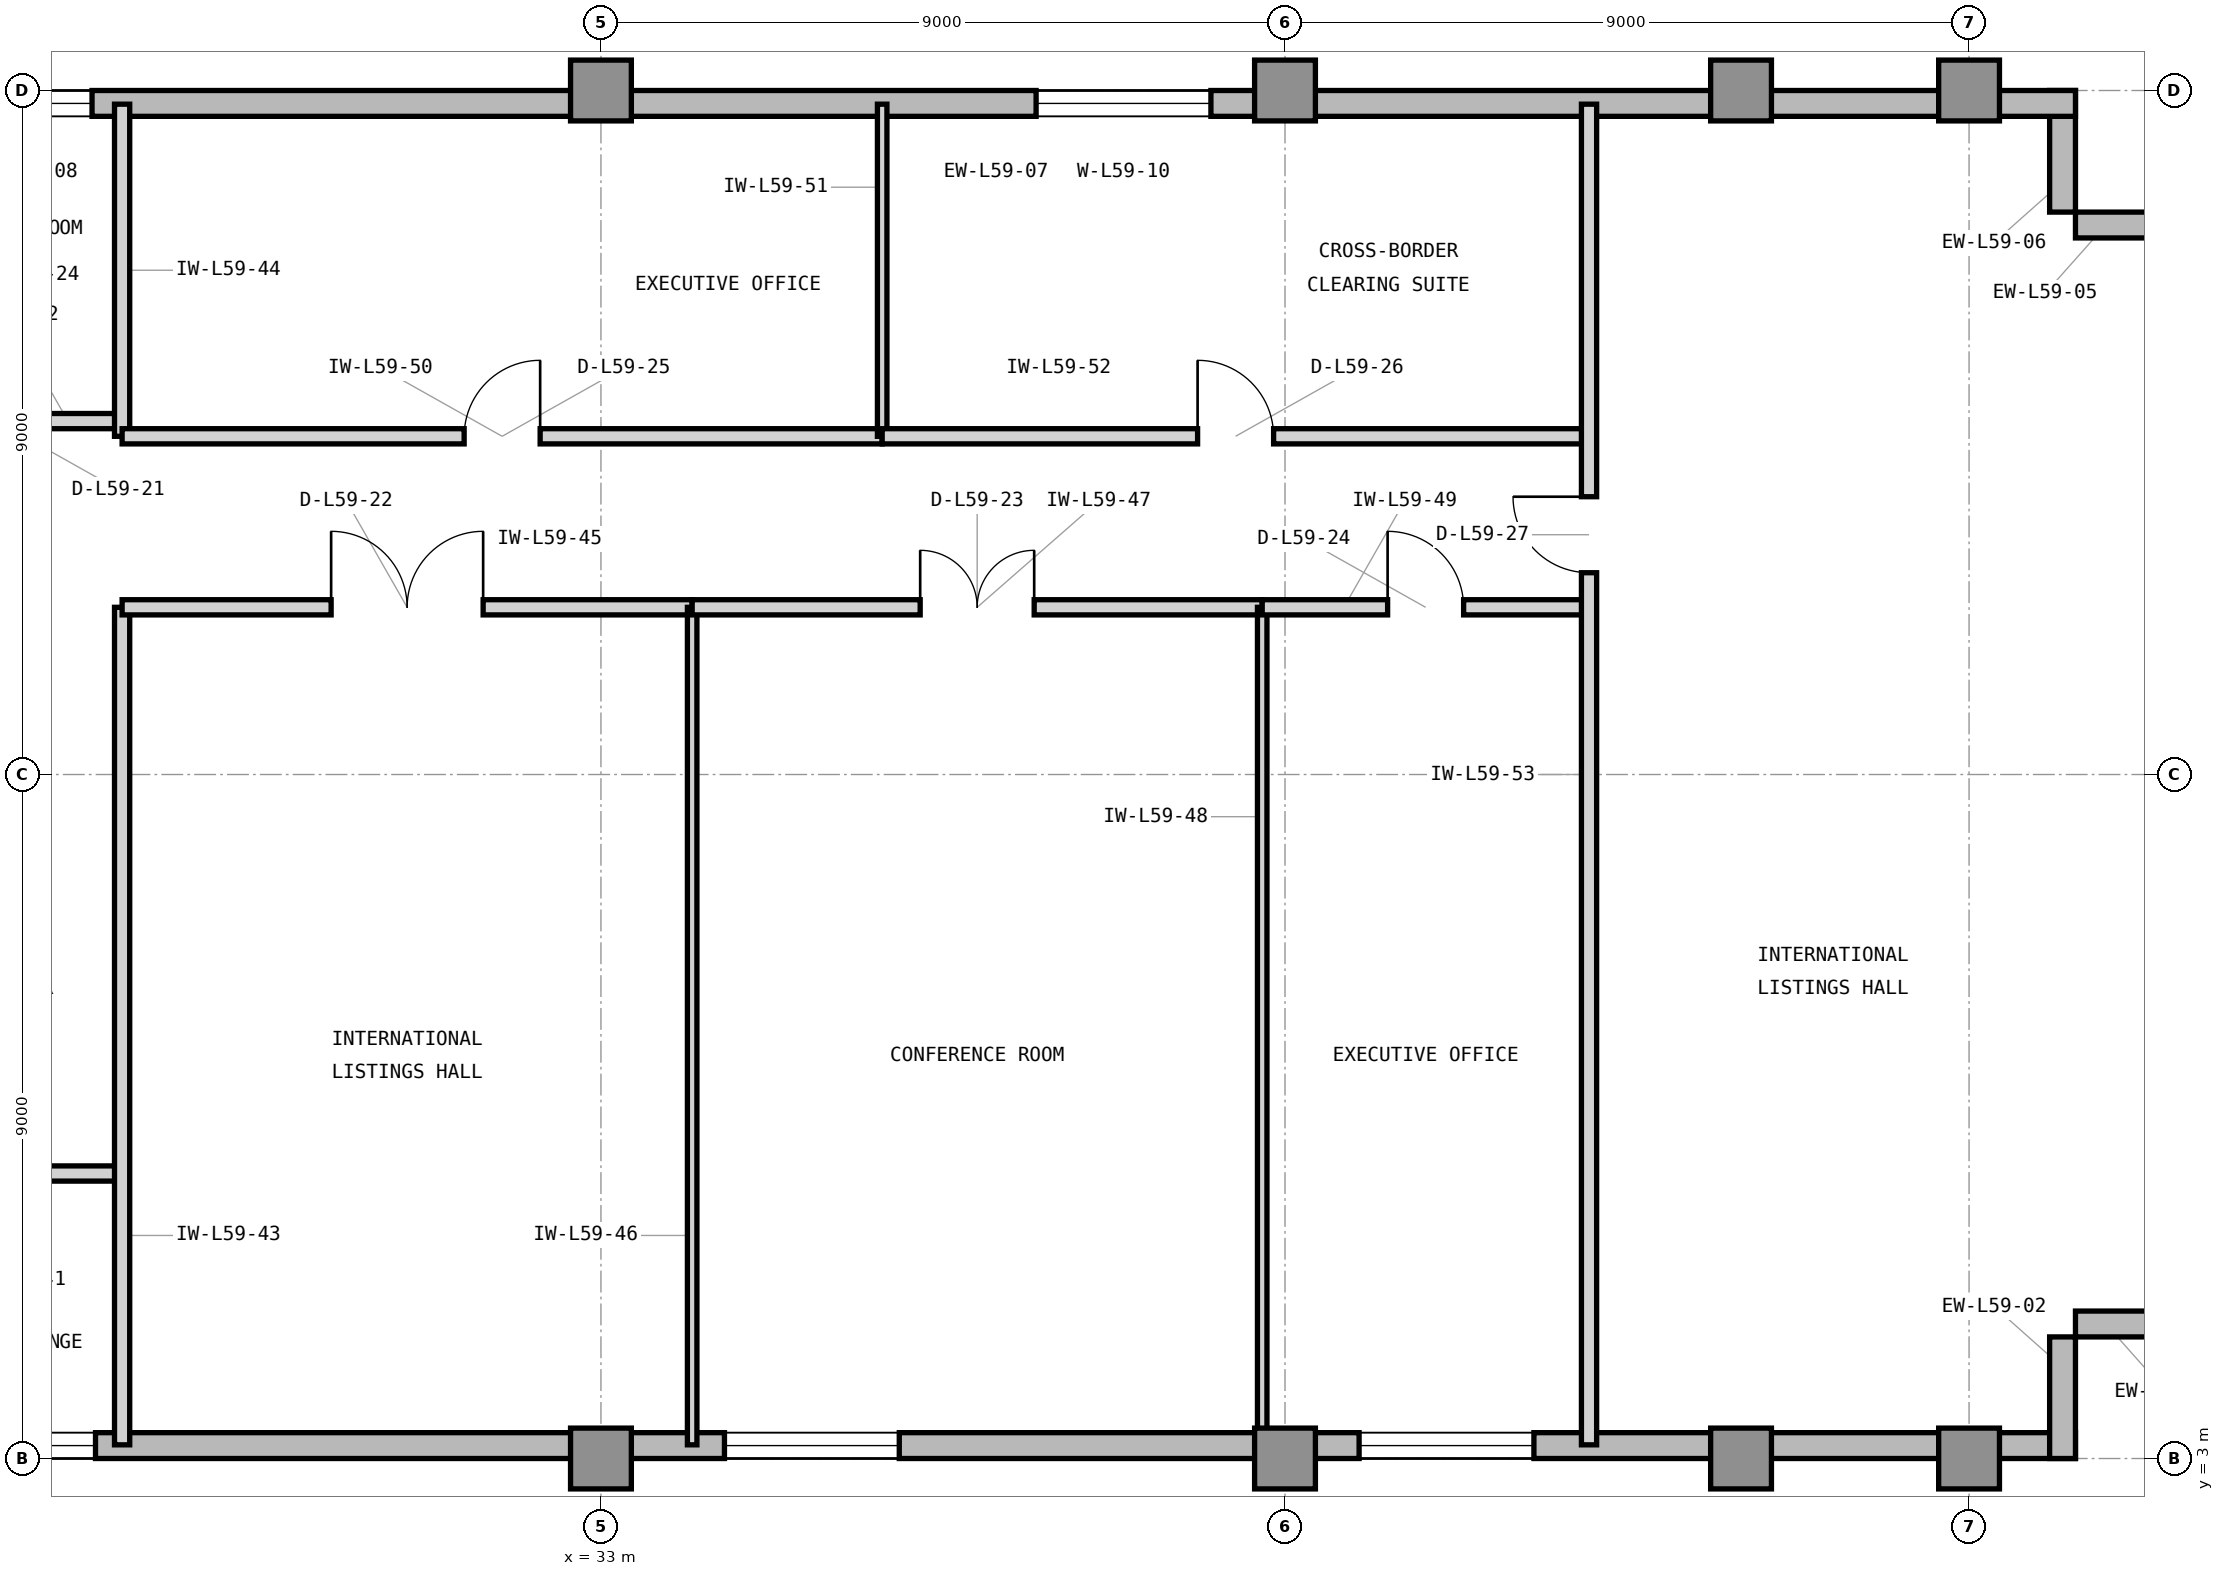
"""IFC4 building model, lengths in metres.
Left out: names, types, materials, properties, quantities, classifications, styles, units other than length and angle.
Written with IfcOpenShell. Run it as: python <this file> out.ifc"""

import sys

from ifc_helpers import new_model, si_unit, direction, frame, frame_2d, origin, origin_2d, place, context, subcontext, project, spatial, rectangle, extrude, element, fill, save


model = new_model("IFC4")
c1 = context("Model", 3, precision=1e-05, world=origin(), true_north=direction((0.0, 1.0)))
c2 = subcontext(c1, "Body", "Model", "MODEL_VIEW")
j1 = project(units=[si_unit("LENGTHUNIT", "METRE"), si_unit("PLANEANGLEUNIT", "RADIAN")], contexts=[c1])
p1 = place(None, origin())
s1 = spatial("IfcSite", under=j1, at=p1, CompositionType="ELEMENT")
p2 = place(p1, origin())
s2 = spatial("IfcBuilding", under=s1, at=p2, CompositionType="ELEMENT")
p3 = place(p2, frame((0.0, 0.0, 243.0)))
s3 = spatial("IfcBuildingStorey", under=s2, at=p3, CompositionType="ELEMENT", Elevation=243.0)
for number, where, z_axis, x_axis in (
    (1, (33.0, 3.0, 0.0), (0.0, 0.0, 1.0), (1.0, 0.0, 0.0)),
    (2, (33.0, 21.0, 0.0), (0.0, 0.0, 1.0), (1.0, 0.0, 0.0)),
    (3, (42.0, 3.0, 0.0), (0.0, 0.0, 1.0), (1.0, 0.0, 0.0)),
    (4, (42.0, 21.0, 0.0), (0.0, 0.0, 1.0), (1.0, 0.0, 0.0)),
    (5, (48.0, 3.0, 0.0), (0.0, 0.0, 1.0), (1.0, 0.0, 0.0)),
    (6, (48.0, 21.0, 0.0), (0.0, 0.0, 1.0), (1.0, 0.0, 0.0)),
    (7, (51.0, 3.0, 0.0), (0.0, 0.0, 1.0), (1.0, 0.0, 0.0)),
    (8, (51.0, 21.0, 0.0), (0.0, 0.0, 1.0), (1.0, 0.0, 0.0)),
):
    element("IfcColumn", number, at=place(p3, frame(where, z_axis=z_axis, x_axis=x_axis)), inside=s3, PredefinedType="COLUMN", context=c2, shape_type="SweptSolid", body=[
        extrude(rectangle(XDim=0.8, YDim=0.8, at=origin_2d()), origin(), (0.0, 0.0, 1.0), 3.9),
    ])
p4 = place(p3, frame((23.9, 3.17, 0.0), z_axis=(0.0, 0.0, 1.0), x_axis=(1.0, 0.0, 0.0)))
e9 = element("IfcWall", 9, at=p4, inside=s3, PredefinedType="STANDARD", context=c2, shape_type="SweptSolid", body=[
    extrude(rectangle(XDim=28.5, YDim=0.34, at=frame_2d((14.25, 0.0))), origin(), (0.0, 0.0, 1.0), 3.7),
])
p5 = place(p4, frame((10.725, 0.0, 0.9)))
e10 = element("IfcOpeningElement", 10, at=p5, cuts=e9, PredefinedType="OPENING", context=c2, shape_type="SweptSolid", body=[
    extrude(rectangle(XDim=2.3, YDim=2.2, at=frame_2d((1.15, 1.1))), frame((0.0, 0.18, 0.0), z_axis=(0.0, -1.0, 0.0), x_axis=(1.0, 0.0, 0.0)), (0.0, 0.0, 1.0), 0.36),
])
p6 = place(p4, frame((0.85, 0.0, 0.9)))
e11 = element("IfcOpeningElement", 11, at=p6, cuts=e9, PredefinedType="OPENING", context=c2, shape_type="SweptSolid", body=[
    extrude(rectangle(XDim=1.6, YDim=2.2, at=frame_2d((0.8, 1.1))), frame((0.0, 0.18, 0.0), z_axis=(0.0, -1.0, 0.0), x_axis=(1.0, 0.0, 0.0)), (0.0, 0.0, 1.0), 0.36),
])
p7 = place(p4, frame((19.075, 0.0, 0.9)))
e12 = element("IfcOpeningElement", 12, at=p7, cuts=e9, PredefinedType="OPENING", context=c2, shape_type="SweptSolid", body=[
    extrude(rectangle(XDim=2.3, YDim=2.2, at=frame_2d((1.15, 1.1))), frame((0.0, 0.18, 0.0), z_axis=(0.0, -1.0, 0.0), x_axis=(1.0, 0.0, 0.0)), (0.0, 0.0, 1.0), 0.36),
])
for number, where, z_axis, x_axis in (
    (13, (52.23, 3.0, 0.0), (0.0, 0.0, 1.0), (0.0, 1.0, 0.0)),
    (14, (52.4, 4.77, 0.0), (0.0, 0.0, 1.0), (1.0, 0.0, 0.0)),
    (15, (54.0, 19.23, 0.0), (0.0, 0.0, 1.0), (-1.0, 0.0, 0.0)),
    (16, (52.23, 19.4, 0.0), (0.0, 0.0, 1.0), (0.0, 1.0, 0.0)),
):
    element("IfcWall", number, at=place(p3, frame(where, z_axis=z_axis, x_axis=x_axis)), inside=s3, PredefinedType="STANDARD", context=c2, shape_type="SweptSolid", body=[
        extrude(rectangle(XDim=1.6, YDim=0.34, at=frame_2d((0.8, 0.0))), origin(), (0.0, 0.0, 1.0), 3.7),
    ])
p8 = place(p3, frame((52.4, 20.83, 0.0), z_axis=(0.0, 0.0, 1.0), x_axis=(-1.0, 0.0, 0.0)))
e17 = element("IfcWall", 17, at=p8, inside=s3, PredefinedType="STANDARD", context=c2, shape_type="SweptSolid", body=[
    extrude(rectangle(XDim=28.4, YDim=0.34, at=frame_2d((14.2, 0.0))), origin(), (0.0, 0.0, 1.0), 3.7),
])
p9 = place(p8, frame((26.096, 0.0, 0.9)))
e18 = element("IfcOpeningElement", 18, at=p9, cuts=e17, PredefinedType="OPENING", context=c2, shape_type="SweptSolid", body=[
    extrude(rectangle(XDim=1.6, YDim=2.2, at=frame_2d((0.8, 1.1))), frame((0.0, 0.18, 0.0), z_axis=(0.0, -1.0, 0.0), x_axis=(1.0, 0.0, 0.0)), (0.0, 0.0, 1.0), 0.36),
])
p10 = place(p8, frame((11.375, 0.0, 0.9)))
e19 = element("IfcOpeningElement", 19, at=p10, cuts=e17, PredefinedType="OPENING", context=c2, shape_type="SweptSolid", body=[
    extrude(rectangle(XDim=2.3, YDim=2.2, at=frame_2d((1.15, 1.1))), frame((0.0, 0.18, 0.0), z_axis=(0.0, -1.0, 0.0), x_axis=(1.0, 0.0, 0.0)), (0.0, 0.0, 1.0), 0.36),
])
p11 = place(p3, frame((23.85, 6.75, 0.0), z_axis=(0.0, 0.0, 1.0), x_axis=(1.0, 0.0, 0.0)))
e20 = element("IfcWall", 20, at=p11, inside=s3, PredefinedType="PARTITIONING", context=c2, shape_type="SweptSolid", body=[
    extrude(rectangle(XDim=2.85, YDim=0.2, at=frame_2d((1.425, 0.0))), origin(), (0.0, 0.0, 1.0), 3.69),
])
p12 = place(p11, frame((0.7, 0.0, 0.0)))
e21 = element("IfcOpeningElement", 21, at=p12, cuts=e20, PredefinedType="OPENING", context=c2, shape_type="SweptSolid", body=[
    extrude(rectangle(XDim=1.0, YDim=2.15, at=frame_2d((0.5, 1.075))), frame((0.0, 0.11, 0.0), z_axis=(0.0, -1.0, 0.0), x_axis=(1.0, 0.0, 0.0)), (0.0, 0.0, 1.0), 0.22),
])
p13 = place(p3, frame((23.85, 16.65, 0.0), z_axis=(0.0, 0.0, 1.0), x_axis=(1.0, 0.0, 0.0)))
e22 = element("IfcWall", 22, at=p13, inside=s3, PredefinedType="PARTITIONING", context=c2, shape_type="SweptSolid", body=[
    extrude(rectangle(XDim=2.85, YDim=0.2, at=frame_2d((1.425, 0.0))), origin(), (0.0, 0.0, 1.0), 3.69),
])
p14 = place(p13, frame((0.7, 0.0, 0.0)))
e23 = element("IfcOpeningElement", 23, at=p14, cuts=e22, PredefinedType="OPENING", context=c2, shape_type="SweptSolid", body=[
    extrude(rectangle(XDim=1.0, YDim=2.15, at=frame_2d((0.5, 1.075))), frame((0.0, 0.11, 0.0), z_axis=(0.0, -1.0, 0.0), x_axis=(1.0, 0.0, 0.0)), (0.0, 0.0, 1.0), 0.22),
])
p15 = place(p3, frame((26.7, 3.18, 0.0), z_axis=(0.0, 0.0, 1.0), x_axis=(0.0, 1.0, 0.0)))
e24 = element("IfcWall", 24, at=p15, inside=s3, PredefinedType="PARTITIONING", context=c2, shape_type="SweptSolid", body=[
    extrude(rectangle(XDim=11.02, YDim=0.2, at=frame_2d((5.51, 0.0))), origin(), (0.0, 0.0, 1.0), 3.69),
])
p16 = place(p3, frame((26.7, 16.45, 0.0), z_axis=(0.0, 0.0, 1.0), x_axis=(0.0, 1.0, 0.0)))
e25 = element("IfcWall", 25, at=p16, inside=s3, PredefinedType="PARTITIONING", context=c2, shape_type="SweptSolid", body=[
    extrude(rectangle(XDim=4.37, YDim=0.2, at=frame_2d((2.185, 0.0))), origin(), (0.0, 0.0, 1.0), 3.69),
])
p17 = place(p3, frame((26.7, 14.2, 0.0), z_axis=(0.0, 0.0, 1.0), x_axis=(1.0, 0.0, 0.0)))
e26 = element("IfcWall", 26, at=p17, inside=s3, PredefinedType="PARTITIONING", context=c2, shape_type="SweptSolid", body=[
    extrude(rectangle(XDim=7.5, YDim=0.2, at=frame_2d((3.75, 0.0))), origin(), (0.0, 0.0, 1.0), 3.69),
])
p18 = place(p17, frame((2.75, 0.0, 0.0)))
e27 = element("IfcOpeningElement", 27, at=p18, cuts=e26, PredefinedType="OPENING", context=c2, shape_type="SweptSolid", body=[
    extrude(rectangle(XDim=2.0, YDim=2.5, at=frame_2d((1.0, 1.25))), frame((0.0, 0.11, 0.0), z_axis=(0.0, -1.0, 0.0), x_axis=(1.0, 0.0, 0.0)), (0.0, 0.0, 1.0), 0.22),
])
p19 = place(p3, frame((34.2, 3.18, 0.0), z_axis=(0.0, 0.0, 1.0), x_axis=(0.0, 1.0, 0.0)))
e28 = element("IfcWall", 28, at=p19, inside=s3, PredefinedType="PARTITIONING", context=c2, shape_type="SweptSolid", body=[
    extrude(rectangle(XDim=11.02, YDim=0.125, at=frame_2d((5.51, 0.0))), origin(), (0.0, 0.0, 1.0), 3.69),
])
p20 = place(p3, frame((34.2, 14.2, 0.0), z_axis=(0.0, 0.0, 1.0), x_axis=(1.0, 0.0, 0.0)))
e29 = element("IfcWall", 29, at=p20, inside=s3, PredefinedType="PARTITIONING", context=c2, shape_type="SweptSolid", body=[
    extrude(rectangle(XDim=7.5, YDim=0.2, at=frame_2d((3.75, 0.0))), origin(), (0.0, 0.0, 1.0), 3.69),
])
p21 = place(p20, frame((3.0, 0.0, 0.0)))
e30 = element("IfcOpeningElement", 30, at=p21, cuts=e29, PredefinedType="OPENING", context=c2, shape_type="SweptSolid", body=[
    extrude(rectangle(XDim=1.5, YDim=2.3, at=frame_2d((0.75, 1.15))), frame((0.0, 0.11, 0.0), z_axis=(0.0, -1.0, 0.0), x_axis=(1.0, 0.0, 0.0)), (0.0, 0.0, 1.0), 0.22),
])
p22 = place(p3, frame((41.7, 3.18, 0.0), z_axis=(0.0, 0.0, 1.0), x_axis=(0.0, 1.0, 0.0)))
e31 = element("IfcWall", 31, at=p22, inside=s3, PredefinedType="PARTITIONING", context=c2, shape_type="SweptSolid", body=[
    extrude(rectangle(XDim=11.02, YDim=0.125, at=frame_2d((5.51, 0.0))), origin(), (0.0, 0.0, 1.0), 3.69),
])
p23 = place(p3, frame((41.7, 14.2, 0.0), z_axis=(0.0, 0.0, 1.0), x_axis=(1.0, 0.0, 0.0)))
e32 = element("IfcWall", 32, at=p23, inside=s3, PredefinedType="PARTITIONING", context=c2, shape_type="SweptSolid", body=[
    extrude(rectangle(XDim=4.3, YDim=0.2, at=frame_2d((2.15, 0.0))), origin(), (0.0, 0.0, 1.0), 3.69),
])
p24 = place(p23, frame((1.65, 0.0, 0.0)))
e33 = element("IfcOpeningElement", 33, at=p24, cuts=e32, PredefinedType="OPENING", context=c2, shape_type="SweptSolid", body=[
    extrude(rectangle(XDim=1.0, YDim=2.15, at=frame_2d((0.5, 1.075))), frame((0.0, 0.11, 0.0), z_axis=(0.0, -1.0, 0.0), x_axis=(1.0, 0.0, 0.0)), (0.0, 0.0, 1.0), 0.22),
])
p25 = place(p3, frame((26.7, 16.45, 0.0), z_axis=(0.0, 0.0, 1.0), x_axis=(1.0, 0.0, 0.0)))
e34 = element("IfcWall", 34, at=p25, inside=s3, PredefinedType="PARTITIONING", context=c2, shape_type="SweptSolid", body=[
    extrude(rectangle(XDim=10.0, YDim=0.2, at=frame_2d((5.0, 0.0))), origin(), (0.0, 0.0, 1.0), 3.69),
])
p26 = place(p25, frame((4.5, 0.0, 0.0)))
e35 = element("IfcOpeningElement", 35, at=p26, cuts=e34, PredefinedType="OPENING", context=c2, shape_type="SweptSolid", body=[
    extrude(rectangle(XDim=1.0, YDim=2.15, at=frame_2d((0.5, 1.075))), frame((0.0, 0.11, 0.0), z_axis=(0.0, -1.0, 0.0), x_axis=(1.0, 0.0, 0.0)), (0.0, 0.0, 1.0), 0.22),
])
p27 = place(p3, frame((36.7, 16.45, 0.0), z_axis=(0.0, 0.0, 1.0), x_axis=(0.0, 1.0, 0.0)))
e36 = element("IfcWall", 36, at=p27, inside=s3, PredefinedType="PARTITIONING", context=c2, shape_type="SweptSolid", body=[
    extrude(rectangle(XDim=4.37, YDim=0.125, at=frame_2d((2.185, 0.0))), origin(), (0.0, 0.0, 1.0), 3.69),
])
p28 = place(p3, frame((36.7, 16.45, 0.0), z_axis=(0.0, 0.0, 1.0), x_axis=(1.0, 0.0, 0.0)))
e37 = element("IfcWall", 37, at=p28, inside=s3, PredefinedType="PARTITIONING", context=c2, shape_type="SweptSolid", body=[
    extrude(rectangle(XDim=9.3, YDim=0.2, at=frame_2d((4.65, 0.0))), origin(), (0.0, 0.0, 1.0), 3.69),
])
p29 = place(p28, frame((4.15, 0.0, 0.0)))
e38 = element("IfcOpeningElement", 38, at=p29, cuts=e37, PredefinedType="OPENING", context=c2, shape_type="SweptSolid", body=[
    extrude(rectangle(XDim=1.0, YDim=2.15, at=frame_2d((0.5, 1.075))), frame((0.0, 0.11, 0.0), z_axis=(0.0, -1.0, 0.0), x_axis=(1.0, 0.0, 0.0)), (0.0, 0.0, 1.0), 0.22),
])
p30 = place(p3, frame((46.0, 3.18, 0.0), z_axis=(0.0, 0.0, 1.0), x_axis=(0.0, 1.0, 0.0)))
e39 = element("IfcWall", 39, at=p30, inside=s3, PredefinedType="PARTITIONING", context=c2, shape_type="SweptSolid", body=[
    extrude(rectangle(XDim=17.64, YDim=0.2, at=frame_2d((8.82, 0.0))), origin(), (0.0, 0.0, 1.0), 3.69),
])
p31 = place(p30, frame((11.475, 0.0, 0.0)))
e40 = element("IfcOpeningElement", 40, at=p31, cuts=e39, PredefinedType="OPENING", context=c2, shape_type="SweptSolid", body=[
    extrude(rectangle(XDim=1.0, YDim=2.15, at=frame_2d((0.5, 1.075))), frame((0.0, 0.11, 0.0), z_axis=(0.0, -1.0, 0.0), x_axis=(1.0, 0.0, 0.0)), (0.0, 0.0, 1.0), 0.22),
])
p32 = place(p5, origin())
e41 = element("IfcWindow", 41, at=p32, inside=s3, PartitioningType="SINGLE_PANEL", PredefinedType="WINDOW", context=c2, shape_type="SweptSolid", body=[
    extrude(rectangle(XDim=2.3, YDim=2.2, at=frame_2d((1.15, 1.1))), frame((0.0, 0.11, 0.0), z_axis=(0.0, -1.0, 0.0), x_axis=(1.0, 0.0, 0.0)), (0.0, 0.0, 1.0), 0.06),
])
fill(e10, e41)
p33 = place(p18, origin())
e42 = element("IfcDoor", 42, at=p33, inside=s3, OperationType="DOUBLE_DOOR_SINGLE_SWING", PredefinedType="DOOR", context=c2, shape_type="SweptSolid", body=[
    extrude(rectangle(XDim=2.0, YDim=2.5, at=frame_2d((1.0, 1.25))), frame((0.0, 0.025, 0.0), z_axis=(0.0, -1.0, 0.0), x_axis=(1.0, 0.0, 0.0)), (0.0, 0.0, 1.0), 0.05),
])
fill(e27, e42)
p34 = place(p21, origin())
e43 = element("IfcDoor", 43, at=p34, inside=s3, OperationType="DOUBLE_DOOR_SINGLE_SWING", PredefinedType="DOOR", context=c2, shape_type="SweptSolid", body=[
    extrude(rectangle(XDim=1.5, YDim=2.3, at=frame_2d((0.75, 1.15))), frame((0.0, 0.025, 0.0), z_axis=(0.0, -1.0, 0.0), x_axis=(1.0, 0.0, 0.0)), (0.0, 0.0, 1.0), 0.05),
])
fill(e30, e43)
p35 = place(p24, origin())
e44 = element("IfcDoor", 44, at=p35, inside=s3, OperationType="SINGLE_SWING_LEFT", PredefinedType="DOOR", context=c2, shape_type="SweptSolid", body=[
    extrude(rectangle(XDim=1.0, YDim=2.15, at=frame_2d((0.5, 1.075))), frame((0.0, 0.025, 0.0), z_axis=(0.0, -1.0, 0.0), x_axis=(1.0, 0.0, 0.0)), (0.0, 0.0, 1.0), 0.05),
])
fill(e33, e44)
p36 = place(p26, origin())
e45 = element("IfcDoor", 45, at=p36, inside=s3, OperationType="SINGLE_SWING_RIGHT", PredefinedType="DOOR", context=c2, shape_type="SweptSolid", body=[
    extrude(rectangle(XDim=1.0, YDim=2.15, at=frame_2d((0.5, 1.075))), frame((0.0, 0.025, 0.0), z_axis=(0.0, -1.0, 0.0), x_axis=(1.0, 0.0, 0.0)), (0.0, 0.0, 1.0), 0.05),
])
fill(e35, e45)
p37 = place(p29, origin())
e46 = element("IfcDoor", 46, at=p37, inside=s3, OperationType="SINGLE_SWING_LEFT", PredefinedType="DOOR", context=c2, shape_type="SweptSolid", body=[
    extrude(rectangle(XDim=1.0, YDim=2.15, at=frame_2d((0.5, 1.075))), frame((0.0, 0.025, 0.0), z_axis=(0.0, -1.0, 0.0), x_axis=(1.0, 0.0, 0.0)), (0.0, 0.0, 1.0), 0.05),
])
fill(e38, e46)
p38 = place(p31, origin())
e47 = element("IfcDoor", 47, at=p38, inside=s3, OperationType="SINGLE_SWING_RIGHT", PredefinedType="DOOR", context=c2, shape_type="SweptSolid", body=[
    extrude(rectangle(XDim=1.0, YDim=2.15, at=frame_2d((0.5, 1.075))), frame((0.0, 0.025, 0.0), z_axis=(0.0, -1.0, 0.0), x_axis=(1.0, 0.0, 0.0)), (0.0, 0.0, 1.0), 0.05),
])
fill(e40, e47)
p39 = place(p6, origin())
e48 = element("IfcWindow", 48, at=p39, inside=s3, PartitioningType="SINGLE_PANEL", PredefinedType="WINDOW", context=c2, shape_type="SweptSolid", body=[
    extrude(rectangle(XDim=1.6, YDim=2.2, at=frame_2d((0.8, 1.1))), frame((0.0, 0.11, 0.0), z_axis=(0.0, -1.0, 0.0), x_axis=(1.0, 0.0, 0.0)), (0.0, 0.0, 1.0), 0.06),
])
fill(e11, e48)
p40 = place(p9, origin())
e49 = element("IfcWindow", 49, at=p40, inside=s3, PartitioningType="SINGLE_PANEL", PredefinedType="WINDOW", context=c2, shape_type="SweptSolid", body=[
    extrude(rectangle(XDim=1.6, YDim=2.2, at=frame_2d((0.8, 1.1))), frame((0.0, 0.11, 0.0), z_axis=(0.0, -1.0, 0.0), x_axis=(1.0, 0.0, 0.0)), (0.0, 0.0, 1.0), 0.06),
])
fill(e18, e49)
p41 = place(p7, origin())
e50 = element("IfcWindow", 50, at=p41, inside=s3, PartitioningType="SINGLE_PANEL", PredefinedType="WINDOW", context=c2, shape_type="SweptSolid", body=[
    extrude(rectangle(XDim=2.3, YDim=2.2, at=frame_2d((1.15, 1.1))), frame((0.0, 0.11, 0.0), z_axis=(0.0, -1.0, 0.0), x_axis=(1.0, 0.0, 0.0)), (0.0, 0.0, 1.0), 0.06),
])
fill(e12, e50)
p42 = place(p10, origin())
e51 = element("IfcWindow", 51, at=p42, inside=s3, PartitioningType="SINGLE_PANEL", PredefinedType="WINDOW", context=c2, shape_type="SweptSolid", body=[
    extrude(rectangle(XDim=2.3, YDim=2.2, at=frame_2d((1.15, 1.1))), frame((0.0, 0.11, 0.0), z_axis=(0.0, -1.0, 0.0), x_axis=(1.0, 0.0, 0.0)), (0.0, 0.0, 1.0), 0.06),
])
fill(e19, e51)
save(model, sys.argv[1])
